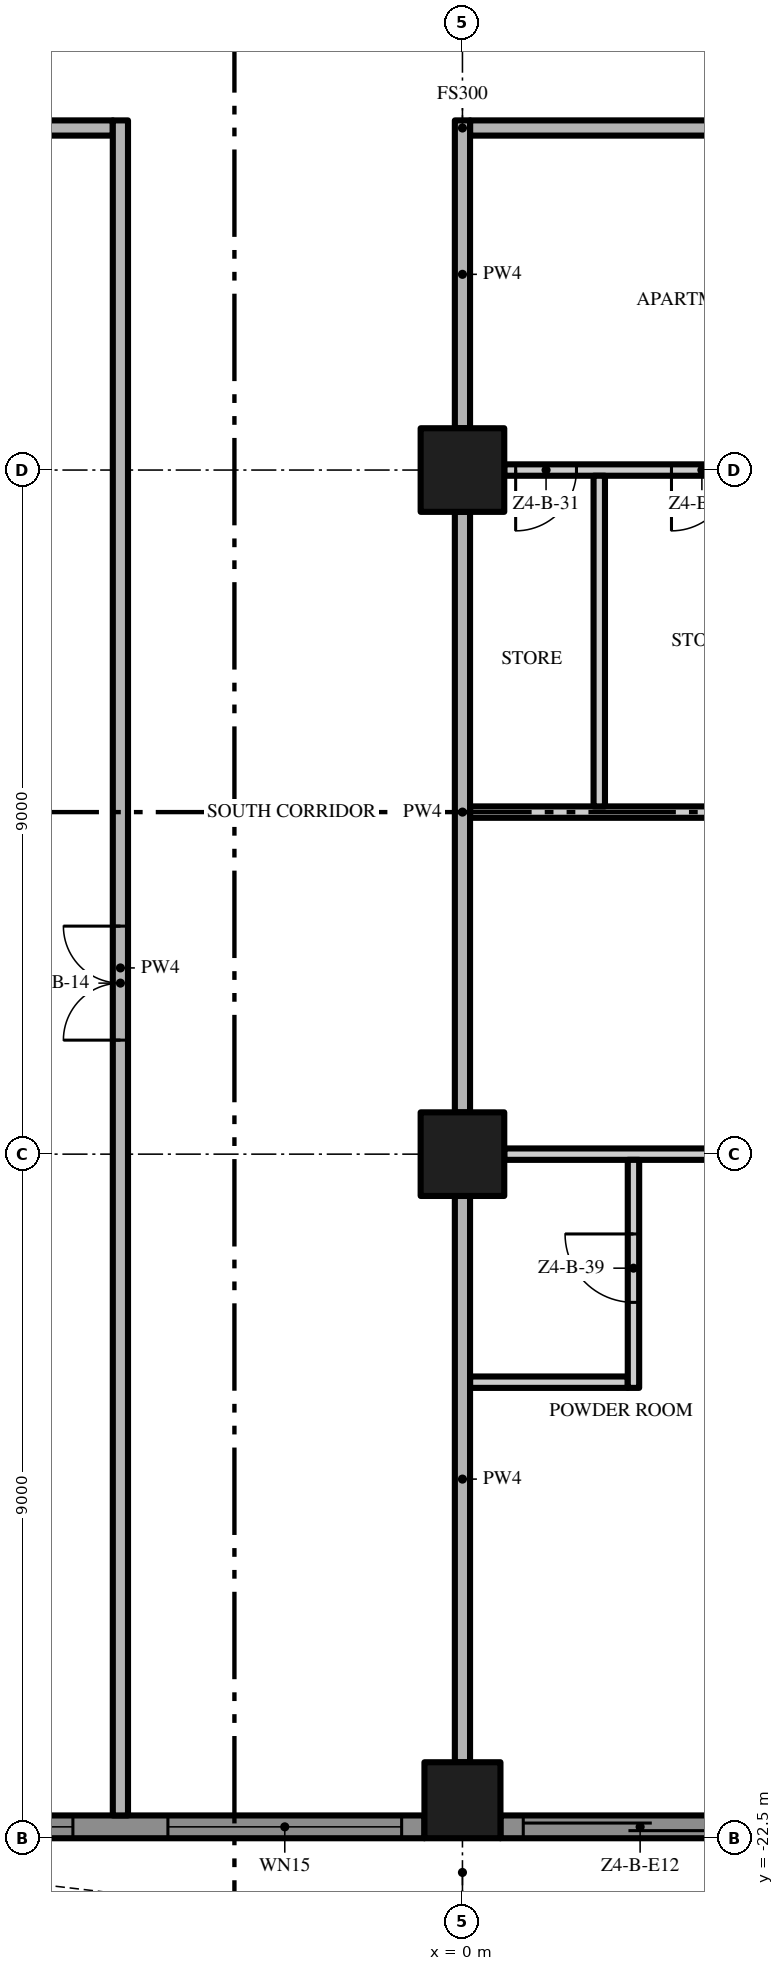
"""IFC4 building model, lengths in metres.
Left out: names, types, materials, properties, quantities, classifications, styles, units other than length and angle.
Written with IfcOpenShell. Run it as: python <this file> out.ifc"""

import sys

from ifc_helpers import new_model, si_unit, direction, frame, frame_2d, origin, origin_2d, place, context, subcontext, project, spatial, polyline, rectangle, outline, extrude, element, fill, save


model = new_model("IFC4")
c1 = context("Model", 3, precision=1e-05, world=origin(), true_north=direction((0.0, 1.0)))
c2 = subcontext(c1, "Body", "Model", "MODEL_VIEW")
j1 = project(units=[si_unit("LENGTHUNIT", "METRE"), si_unit("PLANEANGLEUNIT", "RADIAN")], contexts=[c1])
p1 = place(None, origin())
s1 = spatial("IfcSite", under=j1, at=p1, CompositionType="ELEMENT")
p2 = place(p1, origin())
s2 = spatial("IfcBuilding", under=s1, at=p2, CompositionType="ELEMENT")
p3 = place(p2, frame((0.0, 0.0, 199.6)))
s3 = spatial("IfcBuildingStorey", under=s2, at=p3, CompositionType="ELEMENT", Elevation=199.6)
p4 = place(p3, frame((0.0, -13.5, 0.0), z_axis=(0.0, 0.0, 1.0), x_axis=(1.0, 0.0, 0.0)))
e1 = element("IfcColumn", 1, at=p4, inside=s3, PredefinedType="COLUMN", context=c2, shape_type="SweptSolid", body=[
    extrude(rectangle(XDim=1.1, YDim=1.1, at=origin_2d()), origin(), (0.0, 0.0, 1.0), 3.5),
])
p5 = place(p3, frame((0.0, -22.0, 0.0), z_axis=(0.0, 0.0, 1.0), x_axis=(1.0, 0.0, 0.0)))
e2 = element("IfcColumn", 2, at=p5, inside=s3, PredefinedType="COLUMN", context=c2, shape_type="SweptSolid", body=[
    extrude(rectangle(XDim=1.0, YDim=1.0, at=origin_2d()), origin(), (0.0, 0.0, 1.0), 3.5),
])
p6 = place(p3, frame((0.0, -4.5, 0.0), z_axis=(0.0, 0.0, 1.0), x_axis=(1.0, 0.0, 0.0)))
e3 = element("IfcColumn", 3, at=p6, inside=s3, PredefinedType="COLUMN", context=c2, shape_type="SweptSolid", body=[
    extrude(rectangle(XDim=1.1, YDim=1.1, at=origin_2d()), origin(), (0.0, 0.0, 1.0), 3.5),
])
p7 = place(p3, frame((-0.5, -22.35, 0.0), z_axis=(0.0, 0.0, 1.0), x_axis=(-1.0, 0.0, 0.0)))
e4 = element("IfcWall", 4, at=p7, inside=s3, PredefinedType="SOLIDWALL", context=c2, shape_type="SweptSolid", body=[
    extrude(rectangle(XDim=8.0, YDim=0.3, at=frame_2d((4.0, 0.0))), origin(), (0.0, 0.0, 1.0), 3.5),
])
p8 = place(p7, frame((4.625, 0.0, 0.45)))
e5 = element("IfcOpeningElement", 5, at=p8, cuts=e4, PredefinedType="OPENING", context=c2, shape_type="SweptSolid", body=[
    extrude(rectangle(XDim=3.075, YDim=2.65, at=frame_2d((1.538, 1.325))), frame((0.0, 0.16, 0.0), z_axis=(0.0, -1.0, 0.0), x_axis=(1.0, 0.0, 0.0)), (0.0, 0.0, 1.0), 0.32),
])
p9 = place(p7, frame((0.3, 0.0, 0.45)))
e6 = element("IfcOpeningElement", 6, at=p9, cuts=e4, PredefinedType="OPENING", context=c2, shape_type="SweptSolid", body=[
    extrude(rectangle(XDim=3.075, YDim=2.65, at=frame_2d((1.538, 1.325))), frame((0.0, 0.16, 0.0), z_axis=(0.0, -1.0, 0.0), x_axis=(1.0, 0.0, 0.0)), (0.0, 0.0, 1.0), 0.32),
])
p10 = place(p3, frame((8.5, -22.35, 0.0), z_axis=(0.0, 0.0, 1.0), x_axis=(-1.0, 0.0, 0.0)))
e7 = element("IfcWall", 7, at=p10, inside=s3, PredefinedType="SOLIDWALL", context=c2, shape_type="SweptSolid", body=[
    extrude(rectangle(XDim=8.0, YDim=0.3, at=frame_2d((4.0, 0.0))), origin(), (0.0, 0.0, 1.0), 3.5),
])
p11 = place(p10, frame((4.625, 0.0, 0.0)))
e8 = element("IfcOpeningElement", 8, at=p11, cuts=e7, PredefinedType="OPENING", context=c2, shape_type="SweptSolid", body=[
    extrude(rectangle(XDim=3.075, YDim=2.4, at=frame_2d((1.538, 1.2))), frame((0.0, 0.16, 0.0), z_axis=(0.0, -1.0, 0.0), x_axis=(1.0, 0.0, 0.0)), (0.0, 0.0, 1.0), 0.32),
])
p12 = place(p10, frame((0.3, 0.0, 0.45)))
e9 = element("IfcOpeningElement", 9, at=p12, cuts=e7, PredefinedType="OPENING", context=c2, shape_type="SweptSolid", body=[
    extrude(rectangle(XDim=3.075, YDim=2.65, at=frame_2d((1.538, 1.325))), frame((0.0, 0.16, 0.0), z_axis=(0.0, -1.0, 0.0), x_axis=(1.0, 0.0, 0.0)), (0.0, 0.0, 1.0), 0.32),
])
p13 = place(p3, origin())
e10 = element("IfcWall", 10, at=p13, inside=s3, PredefinedType="USERDEFINED", context=c2, shape_type="SweptSolid", body=[
    extrude(outline(polyline([(-22.5, -23.451), (-21.0, -23.115), (-20.625, -23.1), (-19.5, -23.231), (-18.0, -23.755), (-16.5, -24.488), (-15.0, -25.149), (-13.5, -25.485), (-13.125, -25.5), (-12.0, -25.369), (-10.5, -24.845), (-9.0, -24.112), (-7.5, -23.451), (-6.0, -23.115), (-5.625, -23.1), (-4.5, -23.231), (-3.0, -23.755), (-1.5, -24.488), (0.0, -25.149), (1.5, -25.485), (1.875, -25.5), (3.0, -25.369), (4.5, -24.845), (6.0, -24.112), (7.5, -23.451), (9.0, -23.115), (9.375, -23.1), (10.5, -23.231), (12.0, -23.755), (13.5, -24.488), (15.0, -25.149), (16.5, -25.485), (16.875, -25.5), (18.0, -25.369), (19.5, -24.845), (21.0, -24.112), (22.5, -23.451), (22.399, -23.223), (20.895, -23.885), (19.404, -24.614), (17.944, -25.124), (16.865, -25.249), (16.533, -25.236), (15.079, -24.91), (13.605, -24.261), (12.096, -23.524), (10.556, -22.986), (9.385, -22.849), (8.967, -22.866), (7.421, -23.213), (5.895, -23.885), (4.404, -24.614), (2.944, -25.124), (1.865, -25.249), (1.533, -25.236), (0.079, -24.91), (-1.395, -24.261), (-2.904, -23.524), (-4.444, -22.986), (-5.615, -22.849), (-6.033, -22.866), (-7.579, -23.213), (-9.105, -23.885), (-10.596, -24.614), (-12.056, -25.124), (-13.135, -25.249), (-13.467, -25.236), (-14.921, -24.91), (-16.395, -24.261), (-17.904, -23.524), (-19.444, -22.986), (-20.615, -22.849), (-21.033, -22.866), (-22.555, -23.208), (-22.5, -23.451)])), origin(), (0.0, 0.0, 1.0), 0.9),
])
p14 = place(p3, frame((0.1, -16.5, 0.0), z_axis=(0.0, 0.0, 1.0), x_axis=(1.0, 0.0, 0.0)))
e11 = element("IfcWall", 11, at=p14, inside=s3, PredefinedType="PARTITIONING", context=c2, shape_type="SweptSolid", body=[
    extrude(rectangle(XDim=2.075, YDim=0.15, at=frame_2d((1.038, 0.0))), origin(), (0.0, 0.0, 1.0), 3.5),
])
p15 = place(p3, frame((8.45, -13.5, 0.0), z_axis=(0.0, 0.0, 1.0), x_axis=(-1.0, 0.0, 0.0)))
e12 = element("IfcWall", 12, at=p15, inside=s3, PredefinedType="PARTITIONING", context=c2, shape_type="SweptSolid", body=[
    extrude(rectangle(XDim=7.9, YDim=0.15, at=frame_2d((3.95, 0.0))), origin(), (0.0, 0.0, 1.0), 3.5),
])
p16 = place(p15, frame((1.95, 0.0, 0.0)))
e13 = element("IfcOpeningElement", 13, at=p16, cuts=e12, PredefinedType="OPENING", context=c2, shape_type="SweptSolid", body=[
    extrude(rectangle(XDim=1.8, YDim=2.4, at=frame_2d((0.9, 1.2))), frame((0.0, 0.085, 0.0), z_axis=(0.0, -1.0, 0.0), x_axis=(1.0, 0.0, 0.0)), (0.0, 0.0, 1.0), 0.17),
])
p17 = place(p3, frame((0.1, -9.0, 0.0), z_axis=(0.0, 0.0, 1.0), x_axis=(1.0, 0.0, 0.0)))
e14 = element("IfcWall", 14, at=p17, inside=s3, PredefinedType="PARTITIONING", context=c2, shape_type="SweptSolid", body=[
    extrude(rectangle(XDim=13.4, YDim=0.15, at=frame_2d((6.7, 0.0))), origin(), (0.0, 0.0, 1.0), 3.5),
])
p18 = place(p17, frame((6.9, 0.0, 0.0)))
e15 = element("IfcOpeningElement", 15, at=p18, cuts=e14, PredefinedType="OPENING", context=c2, shape_type="SweptSolid", body=[
    extrude(rectangle(XDim=1.0, YDim=2.4, at=frame_2d((0.5, 1.2))), frame((0.0, 0.085, 0.0), z_axis=(0.0, -1.0, 0.0), x_axis=(1.0, 0.0, 0.0)), (0.0, 0.0, 1.0), 0.17),
])
p19 = place(p3, frame((8.45, -4.5, 0.0), z_axis=(0.0, 0.0, 1.0), x_axis=(-1.0, 0.0, 0.0)))
e16 = element("IfcWall", 16, at=p19, inside=s3, PredefinedType="PARTITIONING", context=c2, shape_type="SweptSolid", body=[
    extrude(rectangle(XDim=7.9, YDim=0.15, at=frame_2d((3.95, 0.0))), origin(), (0.0, 0.0, 1.0), 3.5),
])
p20 = place(p19, frame((6.95, 0.0, 0.0)))
e17 = element("IfcOpeningElement", 17, at=p20, cuts=e16, PredefinedType="OPENING", context=c2, shape_type="SweptSolid", body=[
    extrude(rectangle(XDim=0.8, YDim=2.0, at=frame_2d((0.4, 1.0))), frame((0.0, 0.085, 0.0), z_axis=(0.0, -1.0, 0.0), x_axis=(1.0, 0.0, 0.0)), (0.0, 0.0, 1.0), 0.17),
])
p21 = place(p19, frame((4.9, 0.0, 0.0)))
e18 = element("IfcOpeningElement", 18, at=p21, cuts=e16, PredefinedType="OPENING", context=c2, shape_type="SweptSolid", body=[
    extrude(rectangle(XDim=0.8, YDim=2.0, at=frame_2d((0.4, 1.0))), frame((0.0, 0.085, 0.0), z_axis=(0.0, -1.0, 0.0), x_axis=(1.0, 0.0, 0.0)), (0.0, 0.0, 1.0), 0.17),
])
p22 = place(p3, frame((-17.4, 0.0, 0.0), z_axis=(0.0, 0.0, 1.0), x_axis=(1.0, 0.0, 0.0)))
e19 = element("IfcWall", 19, at=p22, inside=s3, PredefinedType="PARTITIONING", context=c2, shape_type="SweptSolid", body=[
    extrude(rectangle(XDim=12.8, YDim=0.2, at=frame_2d((6.4, 0.0))), origin(), (0.0, 0.0, 1.0), 3.5),
])
p23 = place(p3, frame((17.4, 0.0, 0.0), z_axis=(0.0, 0.0, 1.0), x_axis=(-1.0, 0.0, 0.0)))
e20 = element("IfcWall", 20, at=p23, inside=s3, PredefinedType="PARTITIONING", context=c2, shape_type="SweptSolid", body=[
    extrude(rectangle(XDim=17.3, YDim=0.2, at=frame_2d((8.65, 0.0))), origin(), (0.0, 0.0, 1.0), 3.5),
])
p24 = place(p23, frame((7.65, 0.0, 0.0)))
e21 = element("IfcOpeningElement", 21, at=p24, cuts=e20, PredefinedType="OPENING", context=c2, shape_type="SweptSolid", body=[
    extrude(rectangle(XDim=1.5, YDim=2.4, at=frame_2d((0.75, 1.2))), frame((0.0, 0.11, 0.0), z_axis=(0.0, -1.0, 0.0), x_axis=(1.0, 0.0, 0.0)), (0.0, 0.0, 1.0), 0.22),
])
p25 = place(p3, frame((-4.5, -22.2, 0.0), z_axis=(0.0, 0.0, 1.0), x_axis=(0.0, 1.0, 0.0)))
e22 = element("IfcWall", 22, at=p25, inside=s3, PredefinedType="PARTITIONING", context=c2, shape_type="SweptSolid", body=[
    extrude(rectangle(XDim=22.3, YDim=0.2, at=frame_2d((11.15, 0.0))), origin(), (0.0, 0.0, 1.0), 3.5),
])
p26 = place(p25, frame((10.2, 0.0, 0.0)))
e23 = element("IfcOpeningElement", 23, at=p26, cuts=e22, PredefinedType="OPENING", context=c2, shape_type="SweptSolid", body=[
    extrude(rectangle(XDim=1.5, YDim=2.4, at=frame_2d((0.75, 1.2))), frame((0.0, 0.11, 0.0), z_axis=(0.0, -1.0, 0.0), x_axis=(1.0, 0.0, 0.0)), (0.0, 0.0, 1.0), 0.22),
])
p27 = place(p3, frame((0.0, -21.5, 0.0), z_axis=(0.0, 0.0, 1.0), x_axis=(0.0, 1.0, 0.0)))
e24 = element("IfcWall", 24, at=p27, inside=s3, PredefinedType="PARTITIONING", context=c2, shape_type="SweptSolid", body=[
    extrude(rectangle(XDim=7.45, YDim=0.2, at=frame_2d((3.725, 0.0))), origin(), (0.0, 0.0, 1.0), 3.5),
])
p28 = place(p3, frame((0.0, -12.95, 0.0), z_axis=(0.0, 0.0, 1.0), x_axis=(0.0, 1.0, 0.0)))
e25 = element("IfcWall", 25, at=p28, inside=s3, PredefinedType="PARTITIONING", context=c2, shape_type="SweptSolid", body=[
    extrude(rectangle(XDim=7.9, YDim=0.2, at=frame_2d((3.95, 0.0))), origin(), (0.0, 0.0, 1.0), 3.5),
])
p29 = place(p3, frame((0.0, -3.95, 0.0), z_axis=(0.0, 0.0, 1.0), x_axis=(0.0, 1.0, 0.0)))
e26 = element("IfcWall", 26, at=p29, inside=s3, PredefinedType="PARTITIONING", context=c2, shape_type="SweptSolid", body=[
    extrude(rectangle(XDim=4.05, YDim=0.2, at=frame_2d((2.025, 0.0))), origin(), (0.0, 0.0, 1.0), 3.5),
])
p30 = place(p3, frame((1.8, -8.925, 0.0), z_axis=(0.0, 0.0, 1.0), x_axis=(0.0, 1.0, 0.0)))
e27 = element("IfcWall", 27, at=p30, inside=s3, PredefinedType="PARTITIONING", context=c2, shape_type="SweptSolid", body=[
    extrude(rectangle(XDim=4.35, YDim=0.15, at=frame_2d((2.175, 0.0))), origin(), (0.0, 0.0, 1.0), 3.5),
])
p31 = place(p3, frame((2.25, -16.575, 0.0), z_axis=(0.0, 0.0, 1.0), x_axis=(0.0, 1.0, 0.0)))
e28 = element("IfcWall", 28, at=p31, inside=s3, PredefinedType="PARTITIONING", context=c2, shape_type="SweptSolid", body=[
    extrude(rectangle(XDim=3.0, YDim=0.15, at=frame_2d((1.5, 0.0))), origin(), (0.0, 0.0, 1.0), 3.5),
])
p32 = place(p31, frame((1.125, 0.0, 0.0)))
e29 = element("IfcOpeningElement", 29, at=p32, cuts=e28, PredefinedType="OPENING", context=c2, shape_type="SweptSolid", body=[
    extrude(rectangle(XDim=0.9, YDim=2.1, at=frame_2d((0.45, 1.05))), frame((0.0, 0.085, 0.0), z_axis=(0.0, -1.0, 0.0), x_axis=(1.0, 0.0, 0.0)), (0.0, 0.0, 1.0), 0.17),
])
p33 = place(p8, origin())
e30 = element("IfcWindow", 30, at=p33, inside=s3, PartitioningType="SINGLE_PANEL", PredefinedType="WINDOW", context=c2, shape_type="SweptSolid", body=[
    extrude(rectangle(XDim=3.075, YDim=2.65, at=frame_2d((1.538, 1.325))), frame((0.0, 0.03, 0.0), z_axis=(0.0, -1.0, 0.0), x_axis=(1.0, 0.0, 0.0)), (0.0, 0.0, 1.0), 0.06),
])
fill(e5, e30)
p34 = place(p9, origin())
e31 = element("IfcWindow", 31, at=p34, inside=s3, PartitioningType="SINGLE_PANEL", PredefinedType="WINDOW", context=c2, shape_type="SweptSolid", body=[
    extrude(rectangle(XDim=3.075, YDim=2.65, at=frame_2d((1.538, 1.325))), frame((0.0, 0.03, 0.0), z_axis=(0.0, -1.0, 0.0), x_axis=(1.0, 0.0, 0.0)), (0.0, 0.0, 1.0), 0.06),
])
fill(e6, e31)
p35 = place(p11, origin())
e32 = element("IfcDoor", 32, at=p35, inside=s3, OperationType="SINGLE_SWING_LEFT", PredefinedType="DOOR", context=c2, shape_type="SweptSolid", body=[
    extrude(rectangle(XDim=3.075, YDim=2.4, at=frame_2d((1.538, 1.2))), frame((0.0, 0.025, 0.0), z_axis=(0.0, -1.0, 0.0), x_axis=(1.0, 0.0, 0.0)), (0.0, 0.0, 1.0), 0.05),
])
fill(e8, e32)
p36 = place(p26, origin())
e33 = element("IfcDoor", 33, at=p36, inside=s3, OperationType="DOUBLE_DOOR_SINGLE_SWING", PredefinedType="DOOR", context=c2, shape_type="SweptSolid", body=[
    extrude(rectangle(XDim=1.5, YDim=2.4, at=frame_2d((0.75, 1.2))), frame((0.0, 0.025, 0.0), z_axis=(0.0, -1.0, 0.0), x_axis=(1.0, 0.0, 0.0)), (0.0, 0.0, 1.0), 0.05),
])
fill(e23, e33)
p37 = place(p20, origin())
e34 = element("IfcDoor", 34, at=p37, inside=s3, OperationType="SINGLE_SWING_RIGHT", PredefinedType="DOOR", context=c2, shape_type="SweptSolid", body=[
    extrude(rectangle(XDim=0.8, YDim=2.0, at=frame_2d((0.4, 1.0))), frame((0.0, 0.025, 0.0), z_axis=(0.0, -1.0, 0.0), x_axis=(1.0, 0.0, 0.0)), (0.0, 0.0, 1.0), 0.05),
])
fill(e17, e34)
p38 = place(p21, origin())
e35 = element("IfcDoor", 35, at=p38, inside=s3, OperationType="SINGLE_SWING_RIGHT", PredefinedType="DOOR", context=c2, shape_type="SweptSolid", body=[
    extrude(rectangle(XDim=0.8, YDim=2.0, at=frame_2d((0.4, 1.0))), frame((0.0, 0.025, 0.0), z_axis=(0.0, -1.0, 0.0), x_axis=(1.0, 0.0, 0.0)), (0.0, 0.0, 1.0), 0.05),
])
fill(e18, e35)
p39 = place(p32, origin())
e36 = element("IfcDoor", 36, at=p39, inside=s3, OperationType="SINGLE_SWING_RIGHT", PredefinedType="DOOR", context=c2, shape_type="SweptSolid", body=[
    extrude(rectangle(XDim=0.9, YDim=2.1, at=frame_2d((0.45, 1.05))), frame((0.0, 0.025, 0.0), z_axis=(0.0, -1.0, 0.0), x_axis=(1.0, 0.0, 0.0)), (0.0, 0.0, 1.0), 0.05),
])
fill(e29, e36)
save(model, sys.argv[1])
